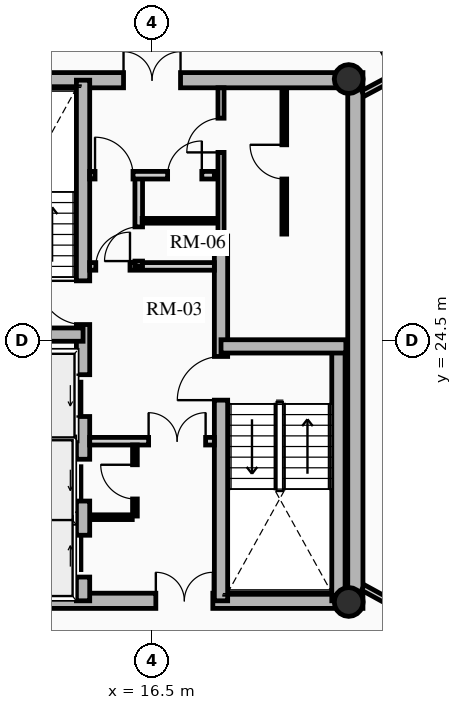
"""IFC4 building model, lengths in metres.
Left out: names, types, materials, properties, quantities, classifications, styles, units other than length and angle.
Written with IfcOpenShell. Run it as: python <this file> out.ifc"""

import sys

from ifc_helpers import new_model, si_unit, direction, frame, frame_2d, origin, origin_2d, place, context, subcontext, project, spatial, rectangle, hollow_circle, extrude, source, transform, mapped, element, fill, save


model = new_model("IFC4")
c1 = context("Model", 3, precision=1e-05, world=origin(), true_north=direction((0.0, 1.0)))
c2 = subcontext(c1, "Body", "Model", "MODEL_VIEW")
j1 = project(units=[si_unit("LENGTHUNIT", "METRE"), si_unit("PLANEANGLEUNIT", "RADIAN")], contexts=[c1])
p1 = place(None, origin())
s1 = spatial("IfcSite", under=j1, at=p1, CompositionType="ELEMENT")
p2 = place(p1, origin())
s2 = spatial("IfcBuilding", under=s1, at=p2, CompositionType="ELEMENT")
p3 = place(p2, frame((0.0, 0.0, 189.43)))
s3 = spatial("IfcBuildingStorey", under=s2, at=p3, CompositionType="ELEMENT", Elevation=189.43)
p4 = place(p3, frame((21.85, 17.45, 0.0), z_axis=(0.0, 0.0, 1.0), x_axis=(0.0, 1.0, 0.0)))
e1 = element("IfcWall", 1, at=p4, inside=s3, PredefinedType="SHEAR", context=c2, shape_type="SweptSolid", body=[
    extrude(rectangle(XDim=14.1, YDim=0.4, at=frame_2d((7.05, 0.0))), origin(), (0.0, 0.0, 1.0), 2.91),
])
p5 = place(p3, frame((11.15, 17.65, 0.0), z_axis=(0.0, 0.0, 1.0), x_axis=(1.0, 0.0, 0.0)))
e2 = element("IfcWall", 2, at=p5, inside=s3, PredefinedType="SHEAR", context=c2, shape_type="SweptSolid", body=[
    extrude(rectangle(XDim=10.7, YDim=0.4, at=frame_2d((5.35, 0.0))), origin(), (0.0, 0.0, 1.0), 2.91),
])
m1 = source(origin(), c2, "Body", "SweptSolid", [
    extrude(rectangle(XDim=1.5, YDim=2.02, at=frame_2d((0.75, 1.01))), frame((0.0, 0.21, 0.0), z_axis=(0.0, -1.0, 0.0), x_axis=(1.0, 0.0, 0.0)), (0.0, 0.0, 1.0), 0.42),
])
p6 = place(p5, frame((5.45, 0.0, 0.0)))
e3 = element("IfcOpeningElement", 3, at=p6, cuts=e2, PredefinedType="OPENING", context=c2, shape_type="MappedRepresentation", body=[
    mapped(m1, transform((0.0, 0.0, 0.0), x_axis=(1.0, 0.0, 0.0), y_axis=(0.0, 1.0, 0.0), z_axis=(0.0, 0.0, 1.0), scale=1.0)),
])
p7 = place(p3, frame((11.15, 31.35, 0.0), z_axis=(0.0, 0.0, 1.0), x_axis=(1.0, 0.0, 0.0)))
e4 = element("IfcWall", 4, at=p7, inside=s3, PredefinedType="SHEAR", context=c2, shape_type="SweptSolid", body=[
    extrude(rectangle(XDim=10.7, YDim=0.4, at=frame_2d((5.35, 0.0))), origin(), (0.0, 0.0, 1.0), 2.91),
])
p8 = place(p7, frame((4.6, 0.0, 0.0)))
e5 = element("IfcOpeningElement", 5, at=p8, cuts=e4, PredefinedType="OPENING", context=c2, shape_type="MappedRepresentation", body=[
    mapped(m1, transform((0.0, 0.0, 0.0), x_axis=(1.0, 0.0, 0.0), y_axis=(0.0, 1.0, 0.0), z_axis=(0.0, 0.0, 1.0), scale=1.0)),
])
p9 = place(p3, frame((14.685, 17.65, 0.0), z_axis=(0.0, 0.0, 1.0), x_axis=(0.0, 1.0, 0.0)))
e6 = element("IfcWall", 6, at=p9, inside=s3, PredefinedType="SHEAR", context=c2, shape_type="SweptSolid", body=[
    extrude(rectangle(XDim=13.7, YDim=0.35, at=frame_2d((6.85, 0.0))), origin(), (0.0, 0.0, 1.0), 2.91),
])
m2 = source(origin(), c2, "Body", "SweptSolid", [
    extrude(rectangle(XDim=1.1, YDim=2.015, at=frame_2d((0.55, 1.007))), frame((0.0, 0.185, 0.0), z_axis=(0.0, -1.0, 0.0), x_axis=(1.0, 0.0, 0.0)), (0.0, 0.0, 1.0), 0.37),
])
p10 = place(p9, frame((4.85, 0.0, 0.0)))
e7 = element("IfcOpeningElement", 7, at=p10, cuts=e6, PredefinedType="OPENING", context=c2, shape_type="MappedRepresentation", body=[
    mapped(m2, transform((0.0, 0.0, 0.0), x_axis=(1.0, 0.0, 0.0), y_axis=(0.0, 1.0, 0.0), z_axis=(0.0, 0.0, 1.0), scale=1.0)),
])
p11 = place(p9, frame((0.625, 0.0, 0.0)))
e8 = element("IfcOpeningElement", 8, at=p11, cuts=e6, PredefinedType="OPENING", context=c2, shape_type="MappedRepresentation", body=[
    mapped(m2, transform((0.0, 0.0, 0.0), x_axis=(1.0, 0.0, 0.0), y_axis=(0.0, 1.0, 0.0), z_axis=(0.0, 0.0, 1.0), scale=1.0)),
])
p12 = place(p9, frame((2.625, 0.0, 0.0)))
e9 = element("IfcOpeningElement", 9, at=p12, cuts=e6, PredefinedType="OPENING", context=c2, shape_type="MappedRepresentation", body=[
    mapped(m2, transform((0.0, 0.0, 0.0), x_axis=(1.0, 0.0, 0.0), y_axis=(0.0, 1.0, 0.0), z_axis=(0.0, 0.0, 1.0), scale=1.0)),
])
m3 = source(origin(), c2, "Body", "SweptSolid", [
    extrude(rectangle(XDim=1.15, YDim=2.02, at=frame_2d((0.575, 1.01))), frame((0.0, 0.185, 0.0), z_axis=(0.0, -1.0, 0.0), x_axis=(1.0, 0.0, 0.0)), (0.0, 0.0, 1.0), 0.37),
])
p13 = place(p9, frame((7.27, 0.0, 0.0)))
e10 = element("IfcOpeningElement", 10, at=p13, cuts=e6, PredefinedType="OPENING", context=c2, shape_type="MappedRepresentation", body=[
    mapped(m3, transform((0.0, 0.0, 0.0), x_axis=(1.0, 0.0, 0.0), y_axis=(0.0, 1.0, 0.0), z_axis=(0.0, 0.0, 1.0), scale=1.0)),
])
p14 = place(p3, frame((18.315, 17.65, 0.0), z_axis=(0.0, 0.0, 1.0), x_axis=(0.0, 1.0, 0.0)))
e11 = element("IfcWall", 11, at=p14, inside=s3, PredefinedType="SHEAR", context=c2, shape_type="SweptSolid", body=[
    extrude(rectangle(XDim=9.6, YDim=0.35, at=frame_2d((4.8, 0.0))), origin(), (0.0, 0.0, 1.0), 2.91),
])
p15 = place(p14, frame((5.28, 0.0, 0.0)))
e12 = element("IfcOpeningElement", 12, at=p15, cuts=e11, PredefinedType="OPENING", context=c2, shape_type="MappedRepresentation", body=[
    mapped(m3, transform((0.0, 0.0, 0.0), x_axis=(1.0, 0.0, 0.0), y_axis=(0.0, 1.0, 0.0), z_axis=(0.0, 0.0, 1.0), scale=1.0)),
])
p16 = place(p3, frame((11.4, 24.655, 0.0), z_axis=(0.0, 0.0, 1.0), x_axis=(1.0, 0.0, 0.0)))
e13 = element("IfcWall", 13, at=p16, inside=s3, PredefinedType="SHEAR", context=c2, shape_type="SweptSolid", body=[
    extrude(rectangle(XDim=3.285, YDim=0.35, at=frame_2d((1.643, 0.0))), origin(), (0.0, 0.0, 1.0), 2.91),
])
p17 = place(p3, frame((21.405, 17.65, 0.0), z_axis=(0.0, 0.0, 1.0), x_axis=(0.0, 1.0, 0.0)))
e14 = element("IfcWall", 14, at=p17, inside=s3, PredefinedType="SHEAR", context=c2, shape_type="SweptSolid", body=[
    extrude(rectangle(XDim=6.695, YDim=0.35, at=frame_2d((3.348, 0.0))), origin(), (0.0, 0.0, 1.0), 2.91),
])
p18 = place(p3, frame((18.315, 24.345, 0.0), z_axis=(0.0, 0.0, 1.0), x_axis=(1.0, 0.0, 0.0)))
e15 = element("IfcWall", 15, at=p18, inside=s3, PredefinedType="SHEAR", context=c2, shape_type="SweptSolid", body=[
    extrude(rectangle(XDim=3.285, YDim=0.35, at=frame_2d((1.643, 0.0))), origin(), (0.0, 0.0, 1.0), 2.91),
])
for number, where, z_axis, x_axis in (
    (16, (21.675, 17.62, 0.0), (0.0, 0.0, 1.0), (1.0, 0.0, 0.0)),
    (17, (21.675, 31.38, 0.0), (0.0, 0.0, 1.0), (1.0, 0.0, 0.0)),
):
    element("IfcColumn", number, at=place(p3, frame(where, z_axis=z_axis, x_axis=x_axis)), inside=s3, PredefinedType="COLUMN", context=c2, shape_type="SweptSolid", body=[
        extrude(hollow_circle(Radius=0.38, WallThickness=0.032, at=origin_2d()), origin(), (0.0, 0.0, 1.0), 2.91),
    ])
for number, where, z_axis, x_axis in (
    (18, (11.52, 21.8, 0.0), (0.0, 0.0, 1.0), (1.0, 0.0, 0.0)),
    (19, (11.52, 19.825, 0.0), (0.0, 0.0, 1.0), (1.0, 0.0, 0.0)),
):
    element("IfcWall", number, at=place(p3, frame(where, z_axis=z_axis, x_axis=x_axis)), inside=s3, PredefinedType="SHEAR", context=c2, shape_type="SweptSolid", body=[
        extrude(rectangle(XDim=2.97, YDim=0.2, at=frame_2d((1.485, 0.0))), origin(), (0.0, 0.0, 1.0), 2.91),
    ])
p19 = place(p3, frame((14.86, 21.85, 0.0), z_axis=(0.0, 0.0, 1.0), x_axis=(1.0, 0.0, 0.0)))
e20 = element("IfcWall", 20, at=p19, inside=s3, PredefinedType="PARTITIONING", context=c2, shape_type="SweptSolid", body=[
    extrude(rectangle(XDim=3.28, YDim=0.2, at=frame_2d((1.64, 0.0))), origin(), (0.0, 0.0, 1.0), 2.555),
])
m4 = source(origin(), c2, "Body", "SweptSolid", [
    extrude(rectangle(XDim=1.5, YDim=2.02, at=frame_2d((0.75, 1.01))), frame((0.0, 0.11, 0.0), z_axis=(0.0, -1.0, 0.0), x_axis=(1.0, 0.0, 0.0)), (0.0, 0.0, 1.0), 0.22),
])
p20 = place(p19, frame((1.55, 0.0, 0.0)))
e21 = element("IfcOpeningElement", 21, at=p20, cuts=e20, PredefinedType="OPENING", context=c2, shape_type="MappedRepresentation", body=[
    mapped(m4, transform((0.0, 0.0, 0.0), x_axis=(1.0, 0.0, 0.0), y_axis=(0.0, 1.0, 0.0), z_axis=(0.0, 0.0, 1.0), scale=1.0)),
])
p21 = place(p3, frame((14.86, 26.45, 0.0), z_axis=(0.0, 0.0, 1.0), x_axis=(1.0, 0.0, 0.0)))
e22 = element("IfcWall", 22, at=p21, inside=s3, PredefinedType="PARTITIONING", context=c2, shape_type="SweptSolid", body=[
    extrude(rectangle(XDim=3.28, YDim=0.2, at=frame_2d((1.64, 0.0))), origin(), (0.0, 0.0, 1.0), 2.555),
])
m5 = source(origin(), c2, "Body", "SweptSolid", [
    extrude(rectangle(XDim=0.9, YDim=2.005, at=frame_2d((0.45, 1.002))), frame((0.0, 0.11, 0.0), z_axis=(0.0, -1.0, 0.0), x_axis=(1.0, 0.0, 0.0)), (0.0, 0.0, 1.0), 0.22),
])
p22 = place(p21, frame((0.16, 0.0, 0.0)))
e23 = element("IfcOpeningElement", 23, at=p22, cuts=e22, PredefinedType="OPENING", context=c2, shape_type="MappedRepresentation", body=[
    mapped(m5, transform((0.0, 0.0, 0.0), x_axis=(1.0, 0.0, 0.0), y_axis=(0.0, 1.0, 0.0), z_axis=(0.0, 0.0, 1.0), scale=1.0)),
])
p23 = place(p3, frame((16.15, 26.45, 0.0), z_axis=(0.0, 0.0, 1.0), x_axis=(0.0, 1.0, 0.0)))
e24 = element("IfcWall", 24, at=p23, inside=s3, PredefinedType="PARTITIONING", context=c2, shape_type="SweptSolid", body=[
    extrude(rectangle(XDim=2.4, YDim=0.2, at=frame_2d((1.2, 0.0))), origin(), (0.0, 0.0, 1.0), 2.555),
])
p24 = place(p23, frame((0.14, 0.0, 0.0)))
e25 = element("IfcOpeningElement", 25, at=p24, cuts=e24, PredefinedType="OPENING", context=c2, shape_type="MappedRepresentation", body=[
    mapped(m5, transform((0.0, 0.0, 0.0), x_axis=(1.0, 0.0, 0.0), y_axis=(0.0, 1.0, 0.0), z_axis=(0.0, 0.0, 1.0), scale=1.0)),
])
p25 = place(p3, frame((14.86, 28.85, 0.0), z_axis=(0.0, 0.0, 1.0), x_axis=(1.0, 0.0, 0.0)))
e26 = element("IfcWall", 26, at=p25, inside=s3, PredefinedType="PARTITIONING", context=c2, shape_type="SweptSolid", body=[
    extrude(rectangle(XDim=3.28, YDim=0.2, at=frame_2d((1.64, 0.0))), origin(), (0.0, 0.0, 1.0), 2.555),
])
m6 = source(origin(), c2, "Body", "SweptSolid", [
    extrude(rectangle(XDim=1.0, YDim=2.015, at=frame_2d((0.5, 1.007))), frame((0.0, 0.11, 0.0), z_axis=(0.0, -1.0, 0.0), x_axis=(1.0, 0.0, 0.0)), (0.0, 0.0, 1.0), 0.22),
])
p26 = place(p25, frame((0.14, 0.0, 0.0)))
e27 = element("IfcOpeningElement", 27, at=p26, cuts=e26, PredefinedType="OPENING", context=c2, shape_type="MappedRepresentation", body=[
    mapped(m6, transform((0.0, 0.0, 0.0), x_axis=(1.0, 0.0, 0.0), y_axis=(0.0, 1.0, 0.0), z_axis=(0.0, 0.0, 1.0), scale=1.0)),
])
p27 = place(p25, frame((2.05, 0.0, 0.0)))
e28 = element("IfcOpeningElement", 28, at=p27, cuts=e26, PredefinedType="OPENING", context=c2, shape_type="MappedRepresentation", body=[
    mapped(m5, transform((0.0, 0.0, 0.0), x_axis=(1.0, 0.0, 0.0), y_axis=(0.0, 1.0, 0.0), z_axis=(0.0, 0.0, 1.0), scale=1.0)),
])
p28 = place(p3, frame((16.05, 19.88, 0.0), z_axis=(0.0, 0.0, 1.0), x_axis=(0.0, 1.0, 0.0)))
e29 = element("IfcWall", 29, at=p28, inside=s3, PredefinedType="PARTITIONING", context=c2, shape_type="SweptSolid", body=[
    extrude(rectangle(XDim=1.87, YDim=0.125, at=frame_2d((0.935, 0.0))), origin(), (0.0, 0.0, 1.0), 2.555),
])
m7 = source(origin(), c2, "Body", "SweptSolid", [
    extrude(rectangle(XDim=0.9, YDim=2.005, at=frame_2d((0.45, 1.002))), frame((0.0, 0.073, 0.0), z_axis=(0.0, -1.0, 0.0), x_axis=(1.0, 0.0, 0.0)), (0.0, 0.0, 1.0), 0.145),
])
p29 = place(p28, frame((0.45, 0.0, 0.0)))
e30 = element("IfcOpeningElement", 30, at=p29, cuts=e29, PredefinedType="OPENING", context=c2, shape_type="MappedRepresentation", body=[
    mapped(m7, transform((0.0, 0.0, 0.0), x_axis=(1.0, 0.0, 0.0), y_axis=(0.0, 1.0, 0.0), z_axis=(0.0, 0.0, 1.0), scale=1.0)),
])
p30 = place(p3, frame((14.88, 19.85, 0.0), z_axis=(0.0, 0.0, 1.0), x_axis=(1.0, 0.0, 0.0)))
e31 = element("IfcWall", 31, at=p30, inside=s3, PredefinedType="PARTITIONING", context=c2, shape_type="SweptSolid", body=[
    extrude(rectangle(XDim=1.1, YDim=0.125, at=frame_2d((0.55, 0.0))), origin(), (0.0, 0.0, 1.0), 2.555),
])
p31 = place(p3, frame((16.24, 27.65, 0.0), z_axis=(0.0, 0.0, 1.0), x_axis=(1.0, 0.0, 0.0)))
e32 = element("IfcWall", 32, at=p31, inside=s3, PredefinedType="PARTITIONING", context=c2, shape_type="SweptSolid", body=[
    extrude(rectangle(XDim=1.88, YDim=0.125, at=frame_2d((0.94, 0.0))), origin(), (0.0, 0.0, 1.0), 2.555),
])
p32 = place(p3, frame((18.315, 27.25, 0.0), z_axis=(0.0, 0.0, 1.0), x_axis=(0.0, 1.0, 0.0)))
e33 = element("IfcWall", 33, at=p32, inside=s3, PredefinedType="PARTITIONING", context=c2, shape_type="SweptSolid", body=[
    extrude(rectangle(XDim=3.9, YDim=0.16, at=frame_2d((1.95, 0.0))), origin(), (0.0, 0.0, 1.0), 2.555),
])
m8 = source(origin(), c2, "Body", "SweptSolid", [
    extrude(rectangle(XDim=0.9, YDim=2.005, at=frame_2d((0.45, 1.002))), frame((0.0, 0.09, 0.0), z_axis=(0.0, -1.0, 0.0), x_axis=(1.0, 0.0, 0.0)), (0.0, 0.0, 1.0), 0.18),
])
p33 = place(p32, frame((2.2, 0.0, 0.0)))
e34 = element("IfcOpeningElement", 34, at=p33, cuts=e33, PredefinedType="OPENING", context=c2, shape_type="MappedRepresentation", body=[
    mapped(m8, transform((0.0, 0.0, 0.0), x_axis=(1.0, 0.0, 0.0), y_axis=(0.0, 1.0, 0.0), z_axis=(0.0, 0.0, 1.0), scale=1.0)),
])
p34 = place(p3, frame((19.98, 27.3, 0.0), z_axis=(0.0, 0.0, 1.0), x_axis=(0.0, 1.0, 0.0)))
e35 = element("IfcWall", 35, at=p34, inside=s3, PredefinedType="PARTITIONING", context=c2, shape_type="SweptSolid", body=[
    extrude(rectangle(XDim=3.82, YDim=0.125, at=frame_2d((1.91, 0.0))), origin(), (0.0, 0.0, 1.0), 2.555),
])
p35 = place(p34, frame((1.45, 0.0, 0.0)))
e36 = element("IfcOpeningElement", 36, at=p35, cuts=e35, PredefinedType="OPENING", context=c2, shape_type="MappedRepresentation", body=[
    mapped(m7, transform((0.0, 0.0, 0.0), x_axis=(1.0, 0.0, 0.0), y_axis=(0.0, 1.0, 0.0), z_axis=(0.0, 0.0, 1.0), scale=1.0)),
])
p36 = place(p3, frame((22.05, 31.0, 0.0), z_axis=(0.0, 0.0, 1.0), x_axis=(0.882791584709, 0.469764853908, 0.0)))
e37 = element("IfcWall", 37, at=p36, inside=s3, PredefinedType="PARTITIONING", context=c2, shape_type="SweptSolid", body=[
    extrude(rectangle(XDim=2.186, YDim=0.16, at=frame_2d((1.093, 0.0))), origin(), (0.0, 0.0, 1.0), 2.125),
])
m9 = source(origin(), c2, "Body", "SweptSolid", [
    extrude(rectangle(XDim=1.05, YDim=2.015, at=frame_2d((0.525, 1.007))), frame((0.0, 0.09, 0.0), z_axis=(0.0, -1.0, 0.0), x_axis=(1.0, 0.0, 0.0)), (0.0, 0.0, 1.0), 0.18),
])
p37 = place(p36, frame((0.936, 0.0, 0.0)))
e38 = element("IfcOpeningElement", 38, at=p37, cuts=e37, PredefinedType="OPENING", context=c2, shape_type="MappedRepresentation", body=[
    mapped(m9, transform((0.0, 0.0, 0.0), x_axis=(1.0, 0.0, 0.0), y_axis=(0.0, 1.0, 0.0), z_axis=(0.0, 0.0, 1.0), scale=1.0)),
])
p38 = place(p3, frame((22.05, 18.0, 0.0), z_axis=(0.0, 0.0, 1.0), x_axis=(0.877252891813, -0.480028503118, 0.0)))
e39 = element("IfcWall", 39, at=p38, inside=s3, PredefinedType="PARTITIONING", context=c2, shape_type="SweptSolid", body=[
    extrude(rectangle(XDim=2.282, YDim=0.16, at=frame_2d((1.141, 0.0))), origin(), (0.0, 0.0, 1.0), 2.125),
])
p39 = place(p38, frame((1.032, 0.0, 0.0)))
e40 = element("IfcOpeningElement", 40, at=p39, cuts=e39, PredefinedType="OPENING", context=c2, shape_type="MappedRepresentation", body=[
    mapped(m9, transform((0.0, 0.0, 0.0), x_axis=(1.0, 0.0, 0.0), y_axis=(0.0, 1.0, 0.0), z_axis=(0.0, 0.0, 1.0), scale=1.0)),
])
m10 = source(origin(), c2, "Body", "SweptSolid", [
    extrude(rectangle(XDim=1.1, YDim=2.015, at=frame_2d((0.55, 1.007))), frame((0.0, 0.025, 0.0), z_axis=(0.0, -1.0, 0.0), x_axis=(1.0, 0.0, 0.0)), (0.0, 0.0, 1.0), 0.05),
])
p40 = place(p10, origin())
e41 = element("IfcDoor", 41, at=p40, inside=s3, OperationType="SLIDING_TO_LEFT", PredefinedType="DOOR", context=c2, shape_type="MappedRepresentation", body=[
    mapped(m10, transform((0.0, 0.0, 0.0), x_axis=(1.0, 0.0, 0.0), y_axis=(0.0, 1.0, 0.0), z_axis=(0.0, 0.0, 1.0), scale=1.0)),
])
fill(e7, e41)
p41 = place(p11, origin())
e42 = element("IfcDoor", 42, at=p41, inside=s3, OperationType="SLIDING_TO_RIGHT", PredefinedType="DOOR", context=c2, shape_type="MappedRepresentation", body=[
    mapped(m10, transform((0.0, 0.0, 0.0), x_axis=(1.0, 0.0, 0.0), y_axis=(0.0, 1.0, 0.0), z_axis=(0.0, 0.0, 1.0), scale=1.0)),
])
fill(e8, e42)
p42 = place(p12, origin())
e43 = element("IfcDoor", 43, at=p42, inside=s3, OperationType="SLIDING_TO_LEFT", PredefinedType="DOOR", context=c2, shape_type="MappedRepresentation", body=[
    mapped(m10, transform((0.0, 0.0, 0.0), x_axis=(1.0, 0.0, 0.0), y_axis=(0.0, 1.0, 0.0), z_axis=(0.0, 0.0, 1.0), scale=1.0)),
])
fill(e9, e43)
m11 = source(origin(), c2, "Body", "SweptSolid", [
    extrude(rectangle(XDim=1.15, YDim=2.02, at=frame_2d((0.575, 1.01))), frame((0.0, 0.025, 0.0), z_axis=(0.0, -1.0, 0.0), x_axis=(1.0, 0.0, 0.0)), (0.0, 0.0, 1.0), 0.05),
])
p43 = place(p13, origin())
e44 = element("IfcDoor", 44, at=p43, inside=s3, OperationType="SINGLE_SWING_RIGHT", PredefinedType="DOOR", context=c2, shape_type="MappedRepresentation", body=[
    mapped(m11, transform((0.0, 0.0, 0.0), x_axis=(1.0, 0.0, 0.0), y_axis=(0.0, 1.0, 0.0), z_axis=(0.0, 0.0, 1.0), scale=1.0)),
])
fill(e10, e44)
p44 = place(p15, origin())
e45 = element("IfcDoor", 45, at=p44, inside=s3, OperationType="SINGLE_SWING_LEFT", PredefinedType="DOOR", context=c2, shape_type="MappedRepresentation", body=[
    mapped(m11, transform((0.0, 0.0, 0.0), x_axis=(1.0, 0.0, 0.0), y_axis=(0.0, 1.0, 0.0), z_axis=(0.0, 0.0, 1.0), scale=1.0)),
])
fill(e12, e45)
m12 = source(origin(), c2, "Body", "SweptSolid", [
    extrude(rectangle(XDim=1.5, YDim=2.02, at=frame_2d((0.75, 1.01))), frame((0.0, 0.025, 0.0), z_axis=(0.0, -1.0, 0.0), x_axis=(1.0, 0.0, 0.0)), (0.0, 0.0, 1.0), 0.05),
])
p45 = place(p8, origin())
e46 = element("IfcDoor", 46, at=p45, inside=s3, OperationType="DOUBLE_DOOR_SINGLE_SWING", PredefinedType="DOOR", context=c2, shape_type="MappedRepresentation", body=[
    mapped(m12, transform((0.0, 0.0, 0.0), x_axis=(1.0, 0.0, 0.0), y_axis=(0.0, 1.0, 0.0), z_axis=(0.0, 0.0, 1.0), scale=1.0)),
])
fill(e5, e46)
p46 = place(p6, origin())
e47 = element("IfcDoor", 47, at=p46, inside=s3, OperationType="DOUBLE_DOOR_SINGLE_SWING", PredefinedType="DOOR", context=c2, shape_type="MappedRepresentation", body=[
    mapped(m12, transform((0.0, 0.0, 0.0), x_axis=(1.0, 0.0, 0.0), y_axis=(0.0, 1.0, 0.0), z_axis=(0.0, 0.0, 1.0), scale=1.0)),
])
fill(e3, e47)
p47 = place(p20, origin())
e48 = element("IfcDoor", 48, at=p47, inside=s3, OperationType="DOUBLE_DOOR_SINGLE_SWING", PredefinedType="DOOR", context=c2, shape_type="MappedRepresentation", body=[
    mapped(m12, transform((0.0, 0.0, 0.0), x_axis=(1.0, 0.0, 0.0), y_axis=(0.0, 1.0, 0.0), z_axis=(0.0, 0.0, 1.0), scale=1.0)),
])
fill(e21, e48)
m13 = source(origin(), c2, "Body", "SweptSolid", [
    extrude(rectangle(XDim=0.9, YDim=2.005, at=frame_2d((0.45, 1.002))), frame((0.0, 0.025, 0.0), z_axis=(0.0, -1.0, 0.0), x_axis=(1.0, 0.0, 0.0)), (0.0, 0.0, 1.0), 0.05),
])
p48 = place(p22, origin())
e49 = element("IfcDoor", 49, at=p48, inside=s3, OperationType="SINGLE_SWING_RIGHT", PredefinedType="DOOR", context=c2, shape_type="MappedRepresentation", body=[
    mapped(m13, transform((0.0, 0.0, 0.0), x_axis=(1.0, 0.0, 0.0), y_axis=(0.0, 1.0, 0.0), z_axis=(0.0, 0.0, 1.0), scale=1.0)),
])
fill(e23, e49)
m14 = source(origin(), c2, "Body", "SweptSolid", [
    extrude(rectangle(XDim=1.0, YDim=2.015, at=frame_2d((0.5, 1.007))), frame((0.0, 0.025, 0.0), z_axis=(0.0, -1.0, 0.0), x_axis=(1.0, 0.0, 0.0)), (0.0, 0.0, 1.0), 0.05),
])
p49 = place(p26, origin())
e50 = element("IfcDoor", 50, at=p49, inside=s3, OperationType="SINGLE_SWING_LEFT", PredefinedType="DOOR", context=c2, shape_type="MappedRepresentation", body=[
    mapped(m14, transform((0.0, 0.0, 0.0), x_axis=(1.0, 0.0, 0.0), y_axis=(0.0, 1.0, 0.0), z_axis=(0.0, 0.0, 1.0), scale=1.0)),
])
fill(e27, e50)
p50 = place(p29, origin())
e51 = element("IfcDoor", 51, at=p50, inside=s3, OperationType="SINGLE_SWING_RIGHT", PredefinedType="DOOR", context=c2, shape_type="MappedRepresentation", body=[
    mapped(m13, transform((0.0, 0.0, 0.0), x_axis=(1.0, 0.0, 0.0), y_axis=(0.0, 1.0, 0.0), z_axis=(0.0, 0.0, 1.0), scale=1.0)),
])
fill(e30, e51)
p51 = place(p24, origin())
e52 = element("IfcDoor", 52, at=p51, inside=s3, OperationType="SINGLE_SWING_LEFT", PredefinedType="DOOR", context=c2, shape_type="MappedRepresentation", body=[
    mapped(m13, transform((0.0, 0.0, 0.0), x_axis=(1.0, 0.0, 0.0), y_axis=(0.0, 1.0, 0.0), z_axis=(0.0, 0.0, 1.0), scale=1.0)),
])
fill(e25, e52)
p52 = place(p27, origin())
e53 = element("IfcDoor", 53, at=p52, inside=s3, OperationType="SINGLE_SWING_RIGHT", PredefinedType="DOOR", context=c2, shape_type="MappedRepresentation", body=[
    mapped(m13, transform((0.0, 0.0, 0.0), x_axis=(1.0, 0.0, 0.0), y_axis=(0.0, 1.0, 0.0), z_axis=(0.0, 0.0, 1.0), scale=1.0)),
])
fill(e28, e53)
p53 = place(p33, origin())
e54 = element("IfcDoor", 54, at=p53, inside=s3, OperationType="SINGLE_SWING_LEFT", PredefinedType="DOOR", context=c2, shape_type="MappedRepresentation", body=[
    mapped(m13, transform((0.0, 0.0, 0.0), x_axis=(1.0, 0.0, 0.0), y_axis=(0.0, 1.0, 0.0), z_axis=(0.0, 0.0, 1.0), scale=1.0)),
])
fill(e34, e54)
p54 = place(p35, origin())
e55 = element("IfcDoor", 55, at=p54, inside=s3, OperationType="SINGLE_SWING_RIGHT", PredefinedType="DOOR", context=c2, shape_type="MappedRepresentation", body=[
    mapped(m13, transform((0.0, 0.0, 0.0), x_axis=(1.0, 0.0, 0.0), y_axis=(0.0, 1.0, 0.0), z_axis=(0.0, 0.0, 1.0), scale=1.0)),
])
fill(e36, e55)
save(model, sys.argv[1])
